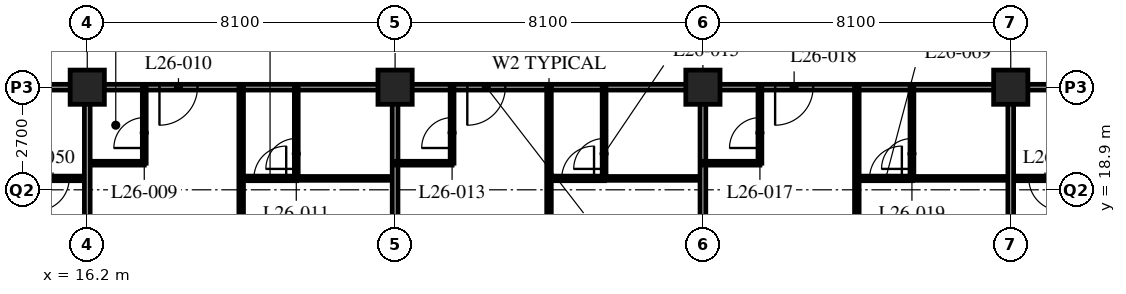
"""IFC4 building model, lengths in metres.
Left out: names, types, materials, properties, quantities, classifications, styles, units other than length and angle.
Written with IfcOpenShell. Run it as: python <this file> out.ifc"""

import sys

from ifc_helpers import new_model, si_unit, direction, frame, frame_2d, origin, origin_2d, place, context, subcontext, project, spatial, rectangle, hollow_rectangle, extrude, element, fill, save


model = new_model("IFC4")
c1 = context("Model", 3, precision=1e-05, world=origin(), true_north=direction((0.0, 1.0)))
c2 = subcontext(c1, "Body", "Model", "MODEL_VIEW")
j1 = project(units=[si_unit("LENGTHUNIT", "METRE"), si_unit("PLANEANGLEUNIT", "RADIAN")], contexts=[c1])
p1 = place(None, origin())
s1 = spatial("IfcSite", under=j1, at=p1, CompositionType="ELEMENT")
p2 = place(p1, origin())
s2 = spatial("IfcBuilding", under=s1, at=p2, CompositionType="ELEMENT")
p3 = place(p2, frame((0.0, 0.0, 106.8)))
s3 = spatial("IfcBuildingStorey", under=s2, at=p3, CompositionType="ELEMENT", Elevation=106.8)
for number, where, z_axis, x_axis in (
    (1, (16.2, 21.6, 0.0), (0.0, 0.0, 1.0), (1.0, 0.0, 0.0)),
    (2, (24.3, 21.6, 0.0), (0.0, 0.0, 1.0), (1.0, 0.0, 0.0)),
    (3, (32.4, 21.6, 0.0), (0.0, 0.0, 1.0), (1.0, 0.0, 0.0)),
    (4, (40.5, 21.6, 0.0), (0.0, 0.0, 1.0), (1.0, 0.0, 0.0)),
):
    element("IfcColumn", number, at=place(p3, frame(where, z_axis=z_axis, x_axis=x_axis)), inside=s3, PredefinedType="COLUMN", context=c2, shape_type="SweptSolid", body=[
        extrude(hollow_rectangle(XDim=0.9, YDim=0.9, WallThickness=0.09, at=origin_2d()), origin(), (0.0, 0.0, 1.0), 3.4),
    ])
p4 = place(p3, frame((12.15, 21.6, 0.0), z_axis=(0.0, 0.0, 1.0), x_axis=(1.0, 0.0, 0.0)))
e5 = element("IfcWall", 5, at=p4, inside=s3, PredefinedType="PARTITIONING", context=c2, shape_type="SweptSolid", body=[
    extrude(rectangle(XDim=32.4, YDim=0.15, at=frame_2d((16.2, 0.0))), origin(), (0.0, 0.0, 1.0), 2.578),
])
p5 = place(p4, frame((5.95, 0.0, 0.0)))
e6 = element("IfcOpeningElement", 6, at=p5, cuts=e5, PredefinedType="OPENING", context=c2, shape_type="SweptSolid", body=[
    extrude(rectangle(XDim=1.0, YDim=2.1, at=frame_2d((0.5, 1.05))), frame((0.0, 0.085, 0.0), z_axis=(0.0, -1.0, 0.0), x_axis=(1.0, 0.0, 0.0)), (0.0, 0.0, 1.0), 0.17),
])
p6 = place(p4, frame((14.05, 0.0, 0.0)))
e7 = element("IfcOpeningElement", 7, at=p6, cuts=e5, PredefinedType="OPENING", context=c2, shape_type="SweptSolid", body=[
    extrude(rectangle(XDim=1.0, YDim=2.1, at=frame_2d((0.5, 1.05))), frame((0.0, 0.085, 0.0), z_axis=(0.0, -1.0, 0.0), x_axis=(1.0, 0.0, 0.0)), (0.0, 0.0, 1.0), 0.17),
])
p7 = place(p4, frame((22.15, 0.0, 0.0)))
e8 = element("IfcOpeningElement", 8, at=p7, cuts=e5, PredefinedType="OPENING", context=c2, shape_type="SweptSolid", body=[
    extrude(rectangle(XDim=1.0, YDim=2.1, at=frame_2d((0.5, 1.05))), frame((0.0, 0.085, 0.0), z_axis=(0.0, -1.0, 0.0), x_axis=(1.0, 0.0, 0.0)), (0.0, 0.0, 1.0), 0.17),
])
p8 = place(p4, frame((1.525, 0.0, 0.0)))
e9 = element("IfcOpeningElement", 9, at=p8, cuts=e5, PredefinedType="OPENING", context=c2, shape_type="SweptSolid", body=[
    extrude(rectangle(XDim=1.0, YDim=2.1, at=frame_2d((0.5, 1.05))), frame((0.0, 0.085, 0.0), z_axis=(0.0, -1.0, 0.0), x_axis=(1.0, 0.0, 0.0)), (0.0, 0.0, 1.0), 0.17),
])
p9 = place(p4, frame((29.875, 0.0, 0.0)))
e10 = element("IfcOpeningElement", 10, at=p9, cuts=e5, PredefinedType="OPENING", context=c2, shape_type="SweptSolid", body=[
    extrude(rectangle(XDim=1.0, YDim=2.1, at=frame_2d((0.5, 1.05))), frame((0.0, 0.085, 0.0), z_axis=(0.0, -1.0, 0.0), x_axis=(1.0, 0.0, 0.0)), (0.0, 0.0, 1.0), 0.17),
])
p10 = place(p3, frame((16.2, 19.6, 0.0), z_axis=(0.0, 0.0, 1.0), x_axis=(1.0, 0.0, 0.0)))
e11 = element("IfcWall", 11, at=p10, inside=s3, PredefinedType="PARTITIONING", context=c2, shape_type="SweptSolid", body=[
    extrude(rectangle(XDim=1.5, YDim=0.1, at=frame_2d((0.75, 0.0))), origin(), (0.0, 0.0, 1.0), 3.19),
])
p11 = place(p3, frame((17.7, 21.6, 0.0), z_axis=(0.0, 0.0, 1.0), x_axis=(0.0, -1.0, 0.0)))
e12 = element("IfcWall", 12, at=p11, inside=s3, PredefinedType="PARTITIONING", context=c2, shape_type="SweptSolid", body=[
    extrude(rectangle(XDim=2.0, YDim=0.1, at=frame_2d((1.0, 0.0))), origin(), (0.0, 0.0, 1.0), 3.19),
])
p12 = place(p11, frame((0.8, 0.0, 0.0)))
e13 = element("IfcOpeningElement", 13, at=p12, cuts=e12, PredefinedType="OPENING", context=c2, shape_type="SweptSolid", body=[
    extrude(rectangle(XDim=0.8, YDim=2.1, at=frame_2d((0.4, 1.05))), frame((0.0, 0.06, 0.0), z_axis=(0.0, -1.0, 0.0), x_axis=(1.0, 0.0, 0.0)), (0.0, 0.0, 1.0), 0.12),
])
p13 = place(p3, frame((21.7, 19.2, 0.0), z_axis=(0.0, 0.0, 1.0), x_axis=(1.0, 0.0, 0.0)))
e14 = element("IfcWall", 14, at=p13, inside=s3, PredefinedType="PARTITIONING", context=c2, shape_type="SweptSolid", body=[
    extrude(rectangle(XDim=2.6, YDim=0.1, at=frame_2d((1.3, 0.0))), origin(), (0.0, 0.0, 1.0), 3.19),
])
p14 = place(p3, frame((21.7, 21.6, 0.0), z_axis=(0.0, 0.0, 1.0), x_axis=(0.0, -1.0, 0.0)))
e15 = element("IfcWall", 15, at=p14, inside=s3, PredefinedType="PARTITIONING", context=c2, shape_type="SweptSolid", body=[
    extrude(rectangle(XDim=2.4, YDim=0.1, at=frame_2d((1.2, 0.0))), origin(), (0.0, 0.0, 1.0), 3.19),
])
p15 = place(p14, frame((1.35, 0.0, 0.0)))
e16 = element("IfcOpeningElement", 16, at=p15, cuts=e15, PredefinedType="OPENING", context=c2, shape_type="SweptSolid", body=[
    extrude(rectangle(XDim=0.8, YDim=2.1, at=frame_2d((0.4, 1.05))), frame((0.0, 0.06, 0.0), z_axis=(0.0, -1.0, 0.0), x_axis=(1.0, 0.0, 0.0)), (0.0, 0.0, 1.0), 0.12),
])
p16 = place(p3, frame((20.25, 21.6, 0.0), z_axis=(0.0, 0.0, 1.0), x_axis=(0.0, -1.0, 0.0)))
e17 = element("IfcWall", 17, at=p16, inside=s3, PredefinedType="PARTITIONING", context=c2, shape_type="SweptSolid", body=[
    extrude(rectangle(XDim=15.9, YDim=0.12, at=frame_2d((7.95, 0.0))), origin(), (0.0, 0.0, 1.0), 3.19),
])
p17 = place(p16, frame((8.875, 0.0, 0.0)))
e18 = element("IfcOpeningElement", 18, at=p17, cuts=e17, PredefinedType="OPENING", context=c2, shape_type="SweptSolid", body=[
    extrude(rectangle(XDim=0.85, YDim=2.1, at=frame_2d((0.425, 1.05))), frame((0.0, 0.07, 0.0), z_axis=(0.0, -1.0, 0.0), x_axis=(1.0, 0.0, 0.0)), (0.0, 0.0, 1.0), 0.14),
])
p18 = place(p3, frame((24.3, 21.6, 0.0), z_axis=(0.0, 0.0, 1.0), x_axis=(0.0, -1.0, 0.0)))
e19 = element("IfcWall", 19, at=p18, inside=s3, PredefinedType="PARTITIONING", context=c2, shape_type="SweptSolid", body=[
    extrude(rectangle(XDim=15.9, YDim=0.15, at=frame_2d((7.95, 0.0))), origin(), (0.0, 0.0, 1.0), 2.578),
])
p19 = place(p3, frame((24.3, 19.6, 0.0), z_axis=(0.0, 0.0, 1.0), x_axis=(1.0, 0.0, 0.0)))
e20 = element("IfcWall", 20, at=p19, inside=s3, PredefinedType="PARTITIONING", context=c2, shape_type="SweptSolid", body=[
    extrude(rectangle(XDim=1.5, YDim=0.1, at=frame_2d((0.75, 0.0))), origin(), (0.0, 0.0, 1.0), 3.19),
])
p20 = place(p3, frame((25.8, 21.6, 0.0), z_axis=(0.0, 0.0, 1.0), x_axis=(0.0, -1.0, 0.0)))
e21 = element("IfcWall", 21, at=p20, inside=s3, PredefinedType="PARTITIONING", context=c2, shape_type="SweptSolid", body=[
    extrude(rectangle(XDim=2.0, YDim=0.1, at=frame_2d((1.0, 0.0))), origin(), (0.0, 0.0, 1.0), 3.19),
])
p21 = place(p20, frame((0.8, 0.0, 0.0)))
e22 = element("IfcOpeningElement", 22, at=p21, cuts=e21, PredefinedType="OPENING", context=c2, shape_type="SweptSolid", body=[
    extrude(rectangle(XDim=0.8, YDim=2.1, at=frame_2d((0.4, 1.05))), frame((0.0, 0.06, 0.0), z_axis=(0.0, -1.0, 0.0), x_axis=(1.0, 0.0, 0.0)), (0.0, 0.0, 1.0), 0.12),
])
p22 = place(p3, frame((29.8, 19.2, 0.0), z_axis=(0.0, 0.0, 1.0), x_axis=(1.0, 0.0, 0.0)))
e23 = element("IfcWall", 23, at=p22, inside=s3, PredefinedType="PARTITIONING", context=c2, shape_type="SweptSolid", body=[
    extrude(rectangle(XDim=2.6, YDim=0.1, at=frame_2d((1.3, 0.0))), origin(), (0.0, 0.0, 1.0), 3.19),
])
p23 = place(p3, frame((29.8, 21.6, 0.0), z_axis=(0.0, 0.0, 1.0), x_axis=(0.0, -1.0, 0.0)))
e24 = element("IfcWall", 24, at=p23, inside=s3, PredefinedType="PARTITIONING", context=c2, shape_type="SweptSolid", body=[
    extrude(rectangle(XDim=2.4, YDim=0.1, at=frame_2d((1.2, 0.0))), origin(), (0.0, 0.0, 1.0), 3.19),
])
p24 = place(p23, frame((1.35, 0.0, 0.0)))
e25 = element("IfcOpeningElement", 25, at=p24, cuts=e24, PredefinedType="OPENING", context=c2, shape_type="SweptSolid", body=[
    extrude(rectangle(XDim=0.8, YDim=2.1, at=frame_2d((0.4, 1.05))), frame((0.0, 0.06, 0.0), z_axis=(0.0, -1.0, 0.0), x_axis=(1.0, 0.0, 0.0)), (0.0, 0.0, 1.0), 0.12),
])
p25 = place(p3, frame((28.35, 21.6, 0.0), z_axis=(0.0, 0.0, 1.0), x_axis=(0.0, -1.0, 0.0)))
e26 = element("IfcWall", 26, at=p25, inside=s3, PredefinedType="PARTITIONING", context=c2, shape_type="SweptSolid", body=[
    extrude(rectangle(XDim=15.9, YDim=0.12, at=frame_2d((7.95, 0.0))), origin(), (0.0, 0.0, 1.0), 3.19),
])
p26 = place(p25, frame((8.875, 0.0, 0.0)))
e27 = element("IfcOpeningElement", 27, at=p26, cuts=e26, PredefinedType="OPENING", context=c2, shape_type="SweptSolid", body=[
    extrude(rectangle(XDim=0.85, YDim=2.1, at=frame_2d((0.425, 1.05))), frame((0.0, 0.07, 0.0), z_axis=(0.0, -1.0, 0.0), x_axis=(1.0, 0.0, 0.0)), (0.0, 0.0, 1.0), 0.14),
])
p27 = place(p3, frame((32.4, 21.6, 0.0), z_axis=(0.0, 0.0, 1.0), x_axis=(0.0, -1.0, 0.0)))
e28 = element("IfcWall", 28, at=p27, inside=s3, PredefinedType="PARTITIONING", context=c2, shape_type="SweptSolid", body=[
    extrude(rectangle(XDim=15.9, YDim=0.15, at=frame_2d((7.95, 0.0))), origin(), (0.0, 0.0, 1.0), 2.578),
])
p28 = place(p3, frame((32.4, 19.6, 0.0), z_axis=(0.0, 0.0, 1.0), x_axis=(1.0, 0.0, 0.0)))
e29 = element("IfcWall", 29, at=p28, inside=s3, PredefinedType="PARTITIONING", context=c2, shape_type="SweptSolid", body=[
    extrude(rectangle(XDim=1.5, YDim=0.1, at=frame_2d((0.75, 0.0))), origin(), (0.0, 0.0, 1.0), 3.19),
])
p29 = place(p3, frame((33.9, 21.6, 0.0), z_axis=(0.0, 0.0, 1.0), x_axis=(0.0, -1.0, 0.0)))
e30 = element("IfcWall", 30, at=p29, inside=s3, PredefinedType="PARTITIONING", context=c2, shape_type="SweptSolid", body=[
    extrude(rectangle(XDim=2.0, YDim=0.1, at=frame_2d((1.0, 0.0))), origin(), (0.0, 0.0, 1.0), 3.19),
])
p30 = place(p29, frame((0.8, 0.0, 0.0)))
e31 = element("IfcOpeningElement", 31, at=p30, cuts=e30, PredefinedType="OPENING", context=c2, shape_type="SweptSolid", body=[
    extrude(rectangle(XDim=0.8, YDim=2.1, at=frame_2d((0.4, 1.05))), frame((0.0, 0.06, 0.0), z_axis=(0.0, -1.0, 0.0), x_axis=(1.0, 0.0, 0.0)), (0.0, 0.0, 1.0), 0.12),
])
p31 = place(p3, frame((37.9, 19.2, 0.0), z_axis=(0.0, 0.0, 1.0), x_axis=(1.0, 0.0, 0.0)))
e32 = element("IfcWall", 32, at=p31, inside=s3, PredefinedType="PARTITIONING", context=c2, shape_type="SweptSolid", body=[
    extrude(rectangle(XDim=2.6, YDim=0.1, at=frame_2d((1.3, 0.0))), origin(), (0.0, 0.0, 1.0), 3.19),
])
p32 = place(p3, frame((37.9, 21.6, 0.0), z_axis=(0.0, 0.0, 1.0), x_axis=(0.0, -1.0, 0.0)))
e33 = element("IfcWall", 33, at=p32, inside=s3, PredefinedType="PARTITIONING", context=c2, shape_type="SweptSolid", body=[
    extrude(rectangle(XDim=2.4, YDim=0.1, at=frame_2d((1.2, 0.0))), origin(), (0.0, 0.0, 1.0), 3.19),
])
p33 = place(p32, frame((1.35, 0.0, 0.0)))
e34 = element("IfcOpeningElement", 34, at=p33, cuts=e33, PredefinedType="OPENING", context=c2, shape_type="SweptSolid", body=[
    extrude(rectangle(XDim=0.8, YDim=2.1, at=frame_2d((0.4, 1.05))), frame((0.0, 0.06, 0.0), z_axis=(0.0, -1.0, 0.0), x_axis=(1.0, 0.0, 0.0)), (0.0, 0.0, 1.0), 0.12),
])
p34 = place(p3, frame((36.45, 21.6, 0.0), z_axis=(0.0, 0.0, 1.0), x_axis=(0.0, -1.0, 0.0)))
e35 = element("IfcWall", 35, at=p34, inside=s3, PredefinedType="PARTITIONING", context=c2, shape_type="SweptSolid", body=[
    extrude(rectangle(XDim=15.9, YDim=0.12, at=frame_2d((7.95, 0.0))), origin(), (0.0, 0.0, 1.0), 3.19),
])
p35 = place(p34, frame((8.875, 0.0, 0.0)))
e36 = element("IfcOpeningElement", 36, at=p35, cuts=e35, PredefinedType="OPENING", context=c2, shape_type="SweptSolid", body=[
    extrude(rectangle(XDim=0.85, YDim=2.1, at=frame_2d((0.425, 1.05))), frame((0.0, 0.07, 0.0), z_axis=(0.0, -1.0, 0.0), x_axis=(1.0, 0.0, 0.0)), (0.0, 0.0, 1.0), 0.14),
])
p36 = place(p3, frame((8.15, 19.2, 0.0), z_axis=(0.0, 0.0, 1.0), x_axis=(1.0, 0.0, 0.0)))
e37 = element("IfcWall", 37, at=p36, inside=s3, PredefinedType="PARTITIONING", context=c2, shape_type="SweptSolid", body=[
    extrude(rectangle(XDim=8.05, YDim=0.12, at=frame_2d((4.025, 0.0))), origin(), (0.0, 0.0, 1.0), 3.19),
])
p37 = place(p36, frame((6.725, 0.0, 0.0)))
e38 = element("IfcOpeningElement", 38, at=p37, cuts=e37, PredefinedType="OPENING", context=c2, shape_type="SweptSolid", body=[
    extrude(rectangle(XDim=0.85, YDim=2.1, at=frame_2d((0.425, 1.05))), frame((0.0, 0.07, 0.0), z_axis=(0.0, -1.0, 0.0), x_axis=(1.0, 0.0, 0.0)), (0.0, 0.0, 1.0), 0.14),
])
p38 = place(p36, frame((2.875, 0.0, 0.0)))
e39 = element("IfcOpeningElement", 39, at=p38, cuts=e37, PredefinedType="OPENING", context=c2, shape_type="SweptSolid", body=[
    extrude(rectangle(XDim=0.85, YDim=2.1, at=frame_2d((0.425, 1.05))), frame((0.0, 0.07, 0.0), z_axis=(0.0, -1.0, 0.0), x_axis=(1.0, 0.0, 0.0)), (0.0, 0.0, 1.0), 0.14),
])
p39 = place(p3, frame((16.2, 21.6, 0.0), z_axis=(0.0, 0.0, 1.0), x_axis=(0.0, -1.0, 0.0)))
e40 = element("IfcWall", 40, at=p39, inside=s3, PredefinedType="PARTITIONING", context=c2, shape_type="SweptSolid", body=[
    extrude(rectangle(XDim=15.9, YDim=0.15, at=frame_2d((7.95, 0.0))), origin(), (0.0, 0.0, 1.0), 2.578),
])
p40 = place(p3, frame((40.5, 19.2, 0.0), z_axis=(0.0, 0.0, 1.0), x_axis=(1.0, 0.0, 0.0)))
e41 = element("IfcWall", 41, at=p40, inside=s3, PredefinedType="PARTITIONING", context=c2, shape_type="SweptSolid", body=[
    extrude(rectangle(XDim=8.05, YDim=0.12, at=frame_2d((4.025, 0.0))), origin(), (0.0, 0.0, 1.0), 3.19),
])
p41 = place(p40, frame((0.475, 0.0, 0.0)))
e42 = element("IfcOpeningElement", 42, at=p41, cuts=e41, PredefinedType="OPENING", context=c2, shape_type="SweptSolid", body=[
    extrude(rectangle(XDim=0.85, YDim=2.1, at=frame_2d((0.425, 1.05))), frame((0.0, 0.07, 0.0), z_axis=(0.0, -1.0, 0.0), x_axis=(1.0, 0.0, 0.0)), (0.0, 0.0, 1.0), 0.14),
])
p42 = place(p40, frame((4.325, 0.0, 0.0)))
e43 = element("IfcOpeningElement", 43, at=p42, cuts=e41, PredefinedType="OPENING", context=c2, shape_type="SweptSolid", body=[
    extrude(rectangle(XDim=0.85, YDim=2.1, at=frame_2d((0.425, 1.05))), frame((0.0, 0.07, 0.0), z_axis=(0.0, -1.0, 0.0), x_axis=(1.0, 0.0, 0.0)), (0.0, 0.0, 1.0), 0.14),
])
p43 = place(p3, frame((40.5, 21.6, 0.0), z_axis=(0.0, 0.0, 1.0), x_axis=(0.0, -1.0, 0.0)))
e44 = element("IfcWall", 44, at=p43, inside=s3, PredefinedType="PARTITIONING", context=c2, shape_type="SweptSolid", body=[
    extrude(rectangle(XDim=15.9, YDim=0.15, at=frame_2d((7.95, 0.0))), origin(), (0.0, 0.0, 1.0), 2.578),
])
p44 = place(p3, frame((21.71, 19.2, 0.0), z_axis=(0.0, 0.0, 1.0), x_axis=(-1.0, 0.0, 0.0)))
e45 = element("IfcWall", 45, at=p44, inside=s3, PredefinedType="PARTITIONING", context=c2, shape_type="SweptSolid", body=[
    extrude(rectangle(XDim=1.46, YDim=0.12, at=frame_2d((0.73, 0.0))), origin(), (0.0, 0.0, 1.0), 3.19),
])
p45 = place(p44, frame((0.275, 0.0, 0.0)))
e46 = element("IfcOpeningElement", 46, at=p45, cuts=e45, PredefinedType="OPENING", context=c2, shape_type="SweptSolid", body=[
    extrude(rectangle(XDim=0.85, YDim=2.1, at=frame_2d((0.425, 1.05))), frame((0.0, 0.07, 0.0), z_axis=(0.0, -1.0, 0.0), x_axis=(1.0, 0.0, 0.0)), (0.0, 0.0, 1.0), 0.14),
])
p46 = place(p3, frame((29.81, 19.2, 0.0), z_axis=(0.0, 0.0, 1.0), x_axis=(-1.0, 0.0, 0.0)))
e47 = element("IfcWall", 47, at=p46, inside=s3, PredefinedType="PARTITIONING", context=c2, shape_type="SweptSolid", body=[
    extrude(rectangle(XDim=1.46, YDim=0.12, at=frame_2d((0.73, 0.0))), origin(), (0.0, 0.0, 1.0), 3.19),
])
p47 = place(p46, frame((0.275, 0.0, 0.0)))
e48 = element("IfcOpeningElement", 48, at=p47, cuts=e47, PredefinedType="OPENING", context=c2, shape_type="SweptSolid", body=[
    extrude(rectangle(XDim=0.85, YDim=2.1, at=frame_2d((0.425, 1.05))), frame((0.0, 0.07, 0.0), z_axis=(0.0, -1.0, 0.0), x_axis=(1.0, 0.0, 0.0)), (0.0, 0.0, 1.0), 0.14),
])
p48 = place(p3, frame((37.91, 19.2, 0.0), z_axis=(0.0, 0.0, 1.0), x_axis=(-1.0, 0.0, 0.0)))
e49 = element("IfcWall", 49, at=p48, inside=s3, PredefinedType="PARTITIONING", context=c2, shape_type="SweptSolid", body=[
    extrude(rectangle(XDim=1.46, YDim=0.12, at=frame_2d((0.73, 0.0))), origin(), (0.0, 0.0, 1.0), 3.19),
])
p49 = place(p48, frame((0.275, 0.0, 0.0)))
e50 = element("IfcOpeningElement", 50, at=p49, cuts=e49, PredefinedType="OPENING", context=c2, shape_type="SweptSolid", body=[
    extrude(rectangle(XDim=0.85, YDim=2.1, at=frame_2d((0.425, 1.05))), frame((0.0, 0.07, 0.0), z_axis=(0.0, -1.0, 0.0), x_axis=(1.0, 0.0, 0.0)), (0.0, 0.0, 1.0), 0.14),
])
p50 = place(p12, origin())
e51 = element("IfcDoor", 51, at=p50, inside=s3, OperationType="SINGLE_SWING_LEFT", PredefinedType="DOOR", context=c2, shape_type="SweptSolid", body=[
    extrude(rectangle(XDim=0.8, YDim=2.1, at=frame_2d((0.4, 1.05))), frame((0.0, 0.025, 0.0), z_axis=(0.0, -1.0, 0.0), x_axis=(1.0, 0.0, 0.0)), (0.0, 0.0, 1.0), 0.05),
])
fill(e13, e51)
p51 = place(p5, origin())
e52 = element("IfcDoor", 52, at=p51, inside=s3, OperationType="SINGLE_SWING_RIGHT", PredefinedType="DOOR", context=c2, shape_type="SweptSolid", body=[
    extrude(rectangle(XDim=1.0, YDim=2.1, at=frame_2d((0.5, 1.05))), frame((0.0, 0.025, 0.0), z_axis=(0.0, -1.0, 0.0), x_axis=(1.0, 0.0, 0.0)), (0.0, 0.0, 1.0), 0.05),
])
fill(e6, e52)
p52 = place(p15, origin())
e53 = element("IfcDoor", 53, at=p52, inside=s3, OperationType="SINGLE_SWING_LEFT", PredefinedType="DOOR", context=c2, shape_type="SweptSolid", body=[
    extrude(rectangle(XDim=0.8, YDim=2.1, at=frame_2d((0.4, 1.05))), frame((0.0, 0.025, 0.0), z_axis=(0.0, -1.0, 0.0), x_axis=(1.0, 0.0, 0.0)), (0.0, 0.0, 1.0), 0.05),
])
fill(e16, e53)
p53 = place(p21, origin())
e54 = element("IfcDoor", 54, at=p53, inside=s3, OperationType="SINGLE_SWING_LEFT", PredefinedType="DOOR", context=c2, shape_type="SweptSolid", body=[
    extrude(rectangle(XDim=0.8, YDim=2.1, at=frame_2d((0.4, 1.05))), frame((0.0, 0.025, 0.0), z_axis=(0.0, -1.0, 0.0), x_axis=(1.0, 0.0, 0.0)), (0.0, 0.0, 1.0), 0.05),
])
fill(e22, e54)
p54 = place(p6, origin())
e55 = element("IfcDoor", 55, at=p54, inside=s3, OperationType="SINGLE_SWING_RIGHT", PredefinedType="DOOR", context=c2, shape_type="SweptSolid", body=[
    extrude(rectangle(XDim=1.0, YDim=2.1, at=frame_2d((0.5, 1.05))), frame((0.0, 0.025, 0.0), z_axis=(0.0, -1.0, 0.0), x_axis=(1.0, 0.0, 0.0)), (0.0, 0.0, 1.0), 0.05),
])
fill(e7, e55)
p55 = place(p24, origin())
e56 = element("IfcDoor", 56, at=p55, inside=s3, OperationType="SINGLE_SWING_LEFT", PredefinedType="DOOR", context=c2, shape_type="SweptSolid", body=[
    extrude(rectangle(XDim=0.8, YDim=2.1, at=frame_2d((0.4, 1.05))), frame((0.0, 0.025, 0.0), z_axis=(0.0, -1.0, 0.0), x_axis=(1.0, 0.0, 0.0)), (0.0, 0.0, 1.0), 0.05),
])
fill(e25, e56)
p56 = place(p30, origin())
e57 = element("IfcDoor", 57, at=p56, inside=s3, OperationType="SINGLE_SWING_LEFT", PredefinedType="DOOR", context=c2, shape_type="SweptSolid", body=[
    extrude(rectangle(XDim=0.8, YDim=2.1, at=frame_2d((0.4, 1.05))), frame((0.0, 0.025, 0.0), z_axis=(0.0, -1.0, 0.0), x_axis=(1.0, 0.0, 0.0)), (0.0, 0.0, 1.0), 0.05),
])
fill(e31, e57)
p57 = place(p7, origin())
e58 = element("IfcDoor", 58, at=p57, inside=s3, OperationType="SINGLE_SWING_RIGHT", PredefinedType="DOOR", context=c2, shape_type="SweptSolid", body=[
    extrude(rectangle(XDim=1.0, YDim=2.1, at=frame_2d((0.5, 1.05))), frame((0.0, 0.025, 0.0), z_axis=(0.0, -1.0, 0.0), x_axis=(1.0, 0.0, 0.0)), (0.0, 0.0, 1.0), 0.05),
])
fill(e8, e58)
p58 = place(p33, origin())
e59 = element("IfcDoor", 59, at=p58, inside=s3, OperationType="SINGLE_SWING_LEFT", PredefinedType="DOOR", context=c2, shape_type="SweptSolid", body=[
    extrude(rectangle(XDim=0.8, YDim=2.1, at=frame_2d((0.4, 1.05))), frame((0.0, 0.025, 0.0), z_axis=(0.0, -1.0, 0.0), x_axis=(1.0, 0.0, 0.0)), (0.0, 0.0, 1.0), 0.05),
])
fill(e34, e59)
p59 = place(p37, origin())
e60 = element("IfcDoor", 60, at=p59, inside=s3, OperationType="SINGLE_SWING_RIGHT", PredefinedType="DOOR", context=c2, shape_type="SweptSolid", body=[
    extrude(rectangle(XDim=0.85, YDim=2.1, at=frame_2d((0.425, 1.05))), frame((0.0, 0.025, 0.0), z_axis=(0.0, -1.0, 0.0), x_axis=(1.0, 0.0, 0.0)), (0.0, 0.0, 1.0), 0.05),
])
fill(e38, e60)
p60 = place(p41, origin())
e61 = element("IfcDoor", 61, at=p60, inside=s3, OperationType="SINGLE_SWING_LEFT", PredefinedType="DOOR", context=c2, shape_type="SweptSolid", body=[
    extrude(rectangle(XDim=0.85, YDim=2.1, at=frame_2d((0.425, 1.05))), frame((0.0, 0.025, 0.0), z_axis=(0.0, -1.0, 0.0), x_axis=(1.0, 0.0, 0.0)), (0.0, 0.0, 1.0), 0.05),
])
fill(e42, e61)
p61 = place(p45, origin())
e62 = element("IfcDoor", 62, at=p61, inside=s3, OperationType="SINGLE_SWING_RIGHT", PredefinedType="DOOR", context=c2, shape_type="SweptSolid", body=[
    extrude(rectangle(XDim=0.85, YDim=2.1, at=frame_2d((0.425, 1.05))), frame((0.0, 0.025, 0.0), z_axis=(0.0, -1.0, 0.0), x_axis=(1.0, 0.0, 0.0)), (0.0, 0.0, 1.0), 0.05),
])
fill(e46, e62)
p62 = place(p47, origin())
e63 = element("IfcDoor", 63, at=p62, inside=s3, OperationType="SINGLE_SWING_RIGHT", PredefinedType="DOOR", context=c2, shape_type="SweptSolid", body=[
    extrude(rectangle(XDim=0.85, YDim=2.1, at=frame_2d((0.425, 1.05))), frame((0.0, 0.025, 0.0), z_axis=(0.0, -1.0, 0.0), x_axis=(1.0, 0.0, 0.0)), (0.0, 0.0, 1.0), 0.05),
])
fill(e48, e63)
p63 = place(p49, origin())
e64 = element("IfcDoor", 64, at=p63, inside=s3, OperationType="SINGLE_SWING_RIGHT", PredefinedType="DOOR", context=c2, shape_type="SweptSolid", body=[
    extrude(rectangle(XDim=0.85, YDim=2.1, at=frame_2d((0.425, 1.05))), frame((0.0, 0.025, 0.0), z_axis=(0.0, -1.0, 0.0), x_axis=(1.0, 0.0, 0.0)), (0.0, 0.0, 1.0), 0.05),
])
fill(e50, e64)
save(model, sys.argv[1])
